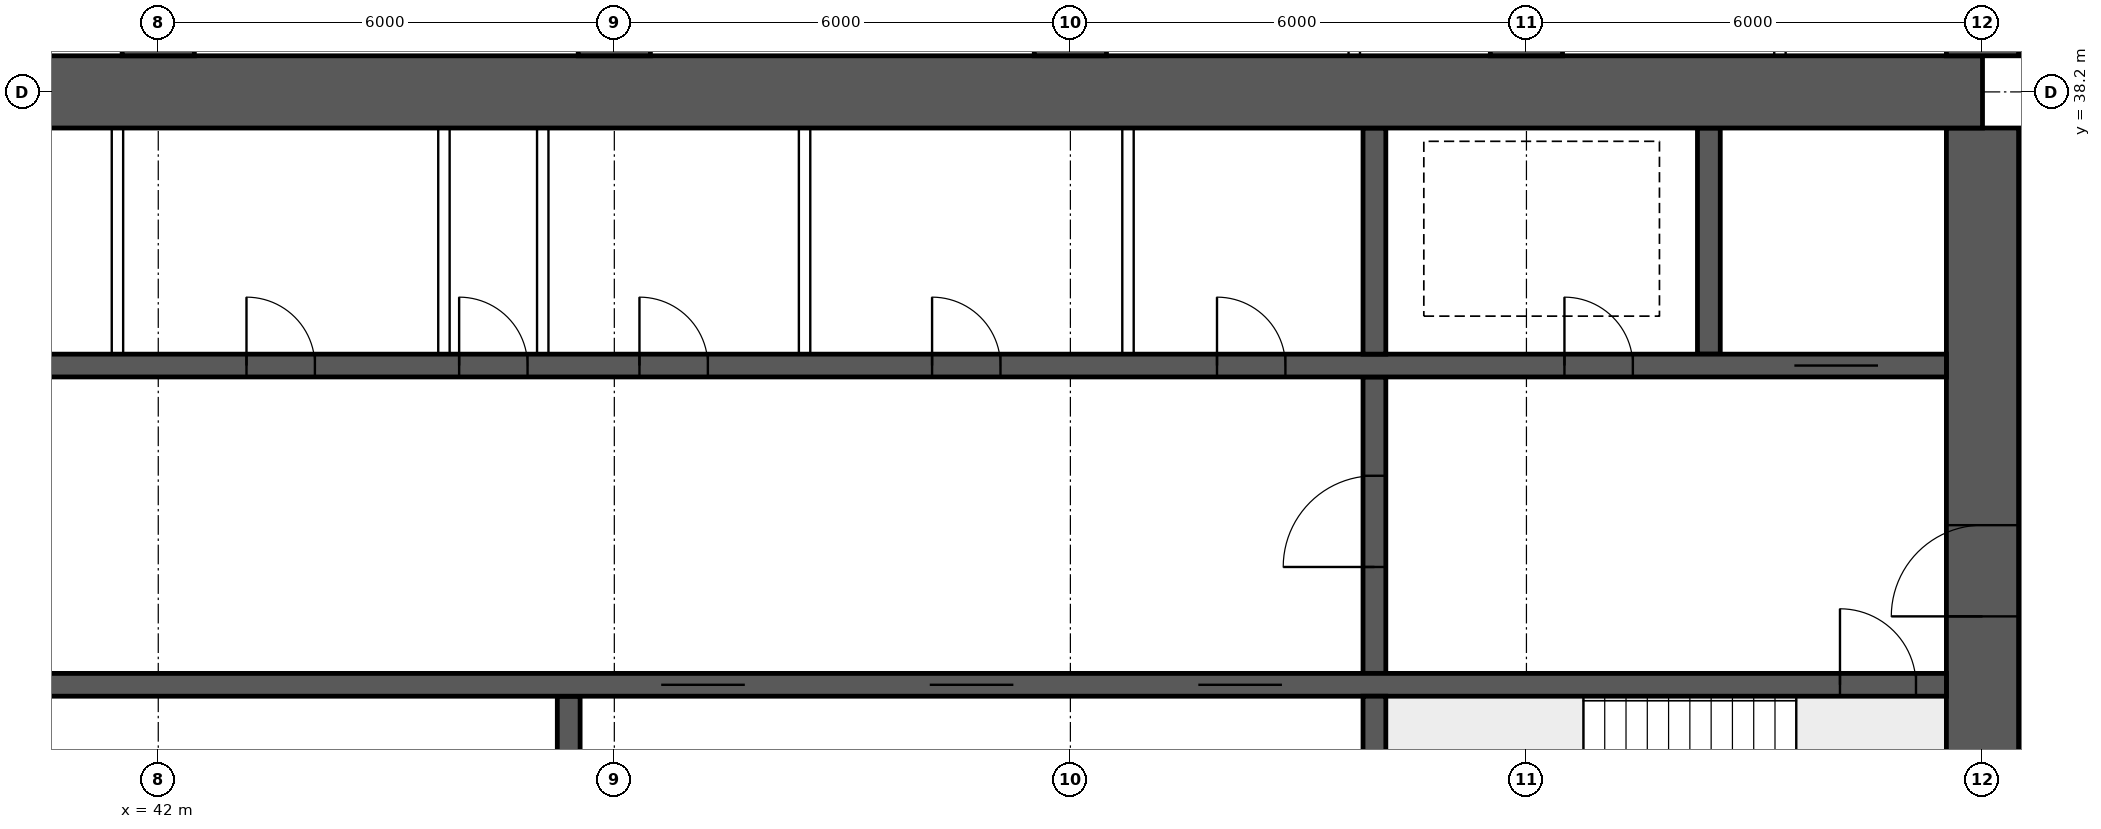
"""IFC4 building model, lengths in metres.
Left out: names, types, materials, properties, quantities, classifications, styles, units other than length and angle.
Written with IfcOpenShell. Run it as: python <this file> out.ifc"""

import sys

from ifc_helpers import new_model, si_unit, direction, frame, frame_2d, origin, place, context, subcontext, project, spatial, rectangle, extrude, element, fill, save


model = new_model("IFC4")
c1 = context("Model", 3, precision=1e-05, world=origin(), true_north=direction((0.0, 1.0)))
c2 = subcontext(c1, "Body", "Model", "MODEL_VIEW")
j1 = project(units=[si_unit("LENGTHUNIT", "METRE"), si_unit("PLANEANGLEUNIT", "RADIAN")], contexts=[c1])
p1 = place(None, origin())
s1 = spatial("IfcSite", under=j1, at=p1, CompositionType="ELEMENT")
p2 = place(p1, origin())
s2 = spatial("IfcBuilding", under=s1, at=p2, CompositionType="ELEMENT")
p3 = place(p2, frame((0.0, 0.0, 114.4)))
s3 = spatial("IfcBuildingStorey", under=s2, at=p3, CompositionType="ELEMENT", Elevation=114.4)
p4 = place(p3, frame((18.0, 38.2, 0.0), z_axis=(0.0, 0.0, 1.0), x_axis=(1.0, 0.0, 0.0)))
e1 = element("IfcWall", 1, at=p4, inside=s3, PredefinedType="SHEAR", context=c2, shape_type="SweptSolid", body=[
    extrude(rectangle(XDim=48.0, YDim=0.95, at=frame_2d((24.0, 0.0))), origin(), (0.0, 0.0, 1.0), 3.75),
])
p5 = place(p3, frame((66.0, 26.275, 0.0), z_axis=(0.0, 0.0, 1.0), x_axis=(0.0, 1.0, 0.0)))
e2 = element("IfcWall", 2, at=p5, inside=s3, PredefinedType="SHEAR", context=c2, shape_type="SweptSolid", body=[
    extrude(rectangle(XDim=11.45, YDim=0.95, at=frame_2d((5.725, 0.0))), origin(), (0.0, 0.0, 1.0), 3.75),
])
p6 = place(p5, frame((5.025, 0.0, 0.0)))
e3 = element("IfcOpeningElement", 3, at=p6, cuts=e2, PredefinedType="OPENING", context=c2, shape_type="SweptSolid", body=[
    extrude(rectangle(XDim=1.2, YDim=2.1, at=frame_2d((0.6, 1.05))), frame((0.0, 0.485, 0.0), z_axis=(0.0, -1.0, 0.0), x_axis=(1.0, 0.0, 0.0)), (0.0, 0.0, 1.0), 0.97),
])
p7 = place(p3, frame((18.475, 30.4, 0.0), z_axis=(0.0, 0.0, 1.0), x_axis=(1.0, 0.0, 0.0)))
e4 = element("IfcWall", 4, at=p7, inside=s3, PredefinedType="SHEAR", context=c2, shape_type="SweptSolid", body=[
    extrude(rectangle(XDim=47.05, YDim=0.3, at=frame_2d((23.525, 0.0))), origin(), (0.0, 0.0, 1.0), 3.75),
])
p8 = place(p7, frame((0.4, 0.0, 0.0)))
e5 = element("IfcOpeningElement", 5, at=p8, cuts=e4, PredefinedType="OPENING", context=c2, shape_type="SweptSolid", body=[
    extrude(rectangle(XDim=1.0, YDim=2.1, at=frame_2d((0.5, 1.05))), frame((0.0, 0.16, 0.0), z_axis=(0.0, -1.0, 0.0), x_axis=(1.0, 0.0, 0.0)), (0.0, 0.0, 1.0), 0.32),
])
p9 = place(p7, frame((45.65, 0.0, 0.0)))
e6 = element("IfcOpeningElement", 6, at=p9, cuts=e4, PredefinedType="OPENING", context=c2, shape_type="SweptSolid", body=[
    extrude(rectangle(XDim=1.0, YDim=2.1, at=frame_2d((0.5, 1.05))), frame((0.0, 0.16, 0.0), z_axis=(0.0, -1.0, 0.0), x_axis=(1.0, 0.0, 0.0)), (0.0, 0.0, 1.0), 0.32),
])
p10 = place(p7, frame((8.275, 0.0, 0.0)))
e7 = element("IfcOpeningElement", 7, at=p10, cuts=e4, PredefinedType="OPENING", context=c2, shape_type="SweptSolid", body=[
    extrude(rectangle(XDim=1.1, YDim=2.1, at=frame_2d((0.55, 1.05))), frame((0.0, 0.16, 0.0), z_axis=(0.0, -1.0, 0.0), x_axis=(1.0, 0.0, 0.0)), (0.0, 0.0, 1.0), 0.32),
])
p11 = place(p7, frame((10.875, 0.0, 0.0)))
e8 = element("IfcOpeningElement", 8, at=p11, cuts=e4, PredefinedType="OPENING", context=c2, shape_type="SweptSolid", body=[
    extrude(rectangle(XDim=1.1, YDim=2.1, at=frame_2d((0.55, 1.05))), frame((0.0, 0.16, 0.0), z_axis=(0.0, -1.0, 0.0), x_axis=(1.0, 0.0, 0.0)), (0.0, 0.0, 1.0), 0.32),
])
p12 = place(p7, frame((13.475, 0.0, 0.0)))
e9 = element("IfcOpeningElement", 9, at=p12, cuts=e4, PredefinedType="OPENING", context=c2, shape_type="SweptSolid", body=[
    extrude(rectangle(XDim=1.1, YDim=2.1, at=frame_2d((0.55, 1.05))), frame((0.0, 0.16, 0.0), z_axis=(0.0, -1.0, 0.0), x_axis=(1.0, 0.0, 0.0)), (0.0, 0.0, 1.0), 0.32),
])
p13 = place(p7, frame((16.075, 0.0, 0.0)))
e10 = element("IfcOpeningElement", 10, at=p13, cuts=e4, PredefinedType="OPENING", context=c2, shape_type="SweptSolid", body=[
    extrude(rectangle(XDim=1.1, YDim=2.1, at=frame_2d((0.55, 1.05))), frame((0.0, 0.16, 0.0), z_axis=(0.0, -1.0, 0.0), x_axis=(1.0, 0.0, 0.0)), (0.0, 0.0, 1.0), 0.32),
])
p14 = place(p7, frame((18.85, 0.0, 0.0)))
e11 = element("IfcOpeningElement", 11, at=p14, cuts=e4, PredefinedType="OPENING", context=c2, shape_type="SweptSolid", body=[
    extrude(rectangle(XDim=0.9, YDim=2.1, at=frame_2d((0.45, 1.05))), frame((0.0, 0.16, 0.0), z_axis=(0.0, -1.0, 0.0), x_axis=(1.0, 0.0, 0.0)), (0.0, 0.0, 1.0), 0.32),
])
p15 = place(p7, frame((30.142, 0.0, 0.0)))
e12 = element("IfcOpeningElement", 12, at=p15, cuts=e4, PredefinedType="OPENING", context=c2, shape_type="SweptSolid", body=[
    extrude(rectangle(XDim=1.1, YDim=2.1, at=frame_2d((0.55, 1.05))), frame((0.0, 0.16, 0.0), z_axis=(0.0, -1.0, 0.0), x_axis=(1.0, 0.0, 0.0)), (0.0, 0.0, 1.0), 0.32),
])
p16 = place(p7, frame((33.675, 0.0, 0.0)))
e13 = element("IfcOpeningElement", 13, at=p16, cuts=e4, PredefinedType="OPENING", context=c2, shape_type="SweptSolid", body=[
    extrude(rectangle(XDim=1.1, YDim=2.1, at=frame_2d((0.55, 1.05))), frame((0.0, 0.16, 0.0), z_axis=(0.0, -1.0, 0.0), x_axis=(1.0, 0.0, 0.0)), (0.0, 0.0, 1.0), 0.32),
])
p17 = place(p7, frame((37.208, 0.0, 0.0)))
e14 = element("IfcOpeningElement", 14, at=p17, cuts=e4, PredefinedType="OPENING", context=c2, shape_type="SweptSolid", body=[
    extrude(rectangle(XDim=1.1, YDim=2.1, at=frame_2d((0.55, 1.05))), frame((0.0, 0.16, 0.0), z_axis=(0.0, -1.0, 0.0), x_axis=(1.0, 0.0, 0.0)), (0.0, 0.0, 1.0), 0.32),
])
p18 = place(p3, frame((18.475, 34.6, 0.0), z_axis=(0.0, 0.0, 1.0), x_axis=(1.0, 0.0, 0.0)))
e15 = element("IfcWall", 15, at=p18, inside=s3, PredefinedType="SHEAR", context=c2, shape_type="SweptSolid", body=[
    extrude(rectangle(XDim=47.05, YDim=0.3, at=frame_2d((23.525, 0.0))), origin(), (0.0, 0.0, 1.0), 3.75),
])
p19 = place(p18, frame((0.9, 0.0, 0.0)))
e16 = element("IfcOpeningElement", 16, at=p19, cuts=e15, PredefinedType="OPENING", context=c2, shape_type="SweptSolid", body=[
    extrude(rectangle(XDim=1.1, YDim=2.1, at=frame_2d((0.55, 1.05))), frame((0.0, 0.16, 0.0), z_axis=(0.0, -1.0, 0.0), x_axis=(1.0, 0.0, 0.0)), (0.0, 0.0, 1.0), 0.32),
])
p20 = place(p18, frame((45.05, 0.0, 0.0)))
e17 = element("IfcOpeningElement", 17, at=p20, cuts=e15, PredefinedType="OPENING", context=c2, shape_type="SweptSolid", body=[
    extrude(rectangle(XDim=1.1, YDim=2.1, at=frame_2d((0.55, 1.05))), frame((0.0, 0.16, 0.0), z_axis=(0.0, -1.0, 0.0), x_axis=(1.0, 0.0, 0.0)), (0.0, 0.0, 1.0), 0.32),
])
p21 = place(p18, frame((4.125, 0.0, 0.0)))
e18 = element("IfcOpeningElement", 18, at=p21, cuts=e15, PredefinedType="OPENING", context=c2, shape_type="SweptSolid", body=[
    extrude(rectangle(XDim=0.9, YDim=2.1, at=frame_2d((0.45, 1.05))), frame((0.0, 0.16, 0.0), z_axis=(0.0, -1.0, 0.0), x_axis=(1.0, 0.0, 0.0)), (0.0, 0.0, 1.0), 0.32),
])
p22 = place(p18, frame((42.025, 0.0, 0.0)))
e19 = element("IfcOpeningElement", 19, at=p22, cuts=e15, PredefinedType="OPENING", context=c2, shape_type="SweptSolid", body=[
    extrude(rectangle(XDim=0.9, YDim=2.1, at=frame_2d((0.45, 1.05))), frame((0.0, 0.16, 0.0), z_axis=(0.0, -1.0, 0.0), x_axis=(1.0, 0.0, 0.0)), (0.0, 0.0, 1.0), 0.32),
])
p23 = place(p18, frame((8.9, 0.0, 0.0)))
e20 = element("IfcOpeningElement", 20, at=p23, cuts=e15, PredefinedType="OPENING", context=c2, shape_type="SweptSolid", body=[
    extrude(rectangle(XDim=0.9, YDim=2.1, at=frame_2d((0.45, 1.05))), frame((0.0, 0.16, 0.0), z_axis=(0.0, -1.0, 0.0), x_axis=(1.0, 0.0, 0.0)), (0.0, 0.0, 1.0), 0.32),
])
p24 = place(p18, frame((12.874, 0.0, 0.0)))
e21 = element("IfcOpeningElement", 21, at=p24, cuts=e15, PredefinedType="OPENING", context=c2, shape_type="SweptSolid", body=[
    extrude(rectangle(XDim=0.9, YDim=2.1, at=frame_2d((0.45, 1.05))), frame((0.0, 0.16, 0.0), z_axis=(0.0, -1.0, 0.0), x_axis=(1.0, 0.0, 0.0)), (0.0, 0.0, 1.0), 0.32),
])
p25 = place(p18, frame((16.521, 0.0, 0.0)))
e22 = element("IfcOpeningElement", 22, at=p25, cuts=e15, PredefinedType="OPENING", context=c2, shape_type="SweptSolid", body=[
    extrude(rectangle(XDim=0.9, YDim=2.1, at=frame_2d((0.45, 1.05))), frame((0.0, 0.16, 0.0), z_axis=(0.0, -1.0, 0.0), x_axis=(1.0, 0.0, 0.0)), (0.0, 0.0, 1.0), 0.32),
])
p26 = place(p18, frame((20.28, 0.0, 0.0)))
e23 = element("IfcOpeningElement", 23, at=p26, cuts=e15, PredefinedType="OPENING", context=c2, shape_type="SweptSolid", body=[
    extrude(rectangle(XDim=0.9, YDim=2.1, at=frame_2d((0.45, 1.05))), frame((0.0, 0.16, 0.0), z_axis=(0.0, -1.0, 0.0), x_axis=(1.0, 0.0, 0.0)), (0.0, 0.0, 1.0), 0.32),
])
p27 = place(p18, frame((24.686, 0.0, 0.0)))
e24 = element("IfcOpeningElement", 24, at=p27, cuts=e15, PredefinedType="OPENING", context=c2, shape_type="SweptSolid", body=[
    extrude(rectangle(XDim=0.9, YDim=2.1, at=frame_2d((0.45, 1.05))), frame((0.0, 0.16, 0.0), z_axis=(0.0, -1.0, 0.0), x_axis=(1.0, 0.0, 0.0)), (0.0, 0.0, 1.0), 0.32),
])
p28 = place(p18, frame((27.483, 0.0, 0.0)))
e25 = element("IfcOpeningElement", 25, at=p28, cuts=e15, PredefinedType="OPENING", context=c2, shape_type="SweptSolid", body=[
    extrude(rectangle(XDim=0.9, YDim=2.1, at=frame_2d((0.45, 1.05))), frame((0.0, 0.16, 0.0), z_axis=(0.0, -1.0, 0.0), x_axis=(1.0, 0.0, 0.0)), (0.0, 0.0, 1.0), 0.32),
])
p29 = place(p18, frame((29.856, 0.0, 0.0)))
e26 = element("IfcOpeningElement", 26, at=p29, cuts=e15, PredefinedType="OPENING", context=c2, shape_type="SweptSolid", body=[
    extrude(rectangle(XDim=0.9, YDim=2.1, at=frame_2d((0.45, 1.05))), frame((0.0, 0.16, 0.0), z_axis=(0.0, -1.0, 0.0), x_axis=(1.0, 0.0, 0.0)), (0.0, 0.0, 1.0), 0.32),
])
p30 = place(p18, frame((33.706, 0.0, 0.0)))
e27 = element("IfcOpeningElement", 27, at=p30, cuts=e15, PredefinedType="OPENING", context=c2, shape_type="SweptSolid", body=[
    extrude(rectangle(XDim=0.9, YDim=2.1, at=frame_2d((0.45, 1.05))), frame((0.0, 0.16, 0.0), z_axis=(0.0, -1.0, 0.0), x_axis=(1.0, 0.0, 0.0)), (0.0, 0.0, 1.0), 0.32),
])
p31 = place(p18, frame((37.454, 0.0, 0.0)))
e28 = element("IfcOpeningElement", 28, at=p31, cuts=e15, PredefinedType="OPENING", context=c2, shape_type="SweptSolid", body=[
    extrude(rectangle(XDim=0.9, YDim=2.1, at=frame_2d((0.45, 1.05))), frame((0.0, 0.16, 0.0), z_axis=(0.0, -1.0, 0.0), x_axis=(1.0, 0.0, 0.0)), (0.0, 0.0, 1.0), 0.32),
])
p32 = place(p3, frame((58.0, 26.275, 0.0), z_axis=(0.0, 0.0, 1.0), x_axis=(0.0, 1.0, 0.0)))
e29 = element("IfcWall", 29, at=p32, inside=s3, PredefinedType="SHEAR", context=c2, shape_type="SweptSolid", body=[
    extrude(rectangle(XDim=3.975, YDim=0.3, at=frame_2d((1.988, 0.0))), origin(), (0.0, 0.0, 1.0), 3.75),
])
p33 = place(p3, frame((58.0, 30.55, 0.0), z_axis=(0.0, 0.0, 1.0), x_axis=(0.0, 1.0, 0.0)))
e30 = element("IfcWall", 30, at=p33, inside=s3, PredefinedType="SHEAR", context=c2, shape_type="SweptSolid", body=[
    extrude(rectangle(XDim=3.9, YDim=0.3, at=frame_2d((1.95, 0.0))), origin(), (0.0, 0.0, 1.0), 3.75),
])
p34 = place(p33, frame((1.4, 0.0, 0.0)))
e31 = element("IfcOpeningElement", 31, at=p34, cuts=e30, PredefinedType="OPENING", context=c2, shape_type="SweptSolid", body=[
    extrude(rectangle(XDim=1.2, YDim=2.1, at=frame_2d((0.6, 1.05))), frame((0.0, 0.16, 0.0), z_axis=(0.0, -1.0, 0.0), x_axis=(1.0, 0.0, 0.0)), (0.0, 0.0, 1.0), 0.32),
])
for number, where, z_axis, x_axis in (
    (32, (62.4, 34.75, 0.0), (0.0, 0.0, 1.0), (0.0, 1.0, 0.0)),
    (33, (58.0, 34.75, 0.0), (0.0, 0.0, 1.0), (0.0, 1.0, 0.0)),
):
    element("IfcWall", number, at=place(p3, frame(where, z_axis=z_axis, x_axis=x_axis)), inside=s3, PredefinedType="SHEAR", context=c2, shape_type="SweptSolid", body=[
        extrude(rectangle(XDim=2.975, YDim=0.3, at=frame_2d((1.488, 0.0))), origin(), (0.0, 0.0, 1.0), 3.75),
    ])
p35 = place(p3, frame((47.4, 26.275, 0.0), z_axis=(0.0, 0.0, 1.0), x_axis=(0.0, 1.0, 0.0)))
e34 = element("IfcWall", 34, at=p35, inside=s3, PredefinedType="SHEAR", context=c2, shape_type="SweptSolid", body=[
    extrude(rectangle(XDim=3.975, YDim=0.3, at=frame_2d((1.988, 0.0))), origin(), (0.0, 0.0, 1.0), 3.75),
])
for number, where, z_axis, x_axis in (
    (35, (42.0, 38.675, 0.0), (0.0, 0.0, 1.0), (0.0, 1.0, 0.0)),
    (36, (48.0, 38.675, 0.0), (0.0, 0.0, 1.0), (0.0, 1.0, 0.0)),
    (37, (54.0, 38.675, 0.0), (0.0, 0.0, 1.0), (0.0, 1.0, 0.0)),
    (38, (60.0, 38.675, 0.0), (0.0, 0.0, 1.0), (0.0, 1.0, 0.0)),
    (39, (66.0, 38.675, 0.0), (0.0, 0.0, 1.0), (0.0, 1.0, 0.0)),
):
    element("IfcWall", number, at=place(p3, frame(where, z_axis=z_axis, x_axis=x_axis)), inside=s3, PredefinedType="SHEAR", context=c2, shape_type="SweptSolid", body=[
        extrude(rectangle(XDim=9.325, YDim=0.95, at=frame_2d((4.663, 0.0))), origin(), (0.0, 0.0, 1.0), 3.75),
    ])
for number, where, z_axis, x_axis in (
    (40, (41.463, 34.75, 0.0), (0.0, 0.0, 1.0), (0.0, 1.0, 0.0)),
    (41, (45.758, 34.75, 0.0), (0.0, 0.0, 1.0), (0.0, 1.0, 0.0)),
    (42, (47.058, 34.75, 0.0), (0.0, 0.0, 1.0), (0.0, 1.0, 0.0)),
    (43, (50.503, 34.75, 0.0), (0.0, 0.0, 1.0), (0.0, 1.0, 0.0)),
    (44, (54.758, 34.75, 0.0), (0.0, 0.0, 1.0), (0.0, 1.0, 0.0)),
):
    element("IfcWall", number, at=place(p3, frame(where, z_axis=z_axis, x_axis=x_axis)), inside=s3, PredefinedType="SOLIDWALL", context=c2, shape_type="SweptSolid", body=[
        extrude(rectangle(XDim=2.975, YDim=0.15, at=frame_2d((1.488, 0.0))), origin(), (0.0, 0.0, 1.0), 3.5),
    ])
for number, where, z_axis, x_axis in (
    (45, (57.735, 38.675, 0.0), (0.0, 0.0, 1.0), (0.0, 1.0, 0.0)),
    (46, (63.335, 38.675, 0.0), (0.0, 0.0, 1.0), (0.0, 1.0, 0.0)),
):
    element("IfcWall", number, at=place(p3, frame(where, z_axis=z_axis, x_axis=x_axis)), inside=s3, PredefinedType="PARTITIONING", context=c2, shape_type="SweptSolid", body=[
        extrude(rectangle(XDim=9.225, YDim=0.15, at=frame_2d((4.612, 0.0))), origin(), (0.0, 0.0, 1.0), 3.5),
    ])
p36 = place(p6, origin())
e47 = element("IfcDoor", 47, at=p36, inside=s3, OperationType="SINGLE_SWING_LEFT", PredefinedType="DOOR", context=c2, shape_type="SweptSolid", body=[
    extrude(rectangle(XDim=1.2, YDim=2.1, at=frame_2d((0.6, 1.05))), frame((0.0, 0.025, 0.0), z_axis=(0.0, -1.0, 0.0), x_axis=(1.0, 0.0, 0.0)), (0.0, 0.0, 1.0), 0.05),
])
fill(e3, e47)
p37 = place(p9, origin())
e48 = element("IfcDoor", 48, at=p37, inside=s3, OperationType="SINGLE_SWING_LEFT", PredefinedType="DOOR", context=c2, shape_type="SweptSolid", body=[
    extrude(rectangle(XDim=1.0, YDim=2.1, at=frame_2d((0.5, 1.05))), frame((0.0, 0.025, 0.0), z_axis=(0.0, -1.0, 0.0), x_axis=(1.0, 0.0, 0.0)), (0.0, 0.0, 1.0), 0.05),
])
fill(e6, e48)
p38 = place(p20, origin())
e49 = element("IfcDoor", 49, at=p38, inside=s3, OperationType="DOUBLE_DOOR_SLIDING", PredefinedType="DOOR", context=c2, shape_type="SweptSolid", body=[
    extrude(rectangle(XDim=1.1, YDim=2.1, at=frame_2d((0.55, 1.05))), frame((0.0, 0.025, 0.0), z_axis=(0.0, -1.0, 0.0), x_axis=(1.0, 0.0, 0.0)), (0.0, 0.0, 1.0), 0.05),
])
fill(e17, e49)
p39 = place(p22, origin())
e50 = element("IfcDoor", 50, at=p39, inside=s3, OperationType="SINGLE_SWING_LEFT", PredefinedType="DOOR", context=c2, shape_type="SweptSolid", body=[
    extrude(rectangle(XDim=0.9, YDim=2.1, at=frame_2d((0.45, 1.05))), frame((0.0, 0.025, 0.0), z_axis=(0.0, -1.0, 0.0), x_axis=(1.0, 0.0, 0.0)), (0.0, 0.0, 1.0), 0.05),
])
fill(e19, e50)
p40 = place(p34, origin())
e51 = element("IfcDoor", 51, at=p40, inside=s3, OperationType="SINGLE_SWING_LEFT", PredefinedType="DOOR", context=c2, shape_type="SweptSolid", body=[
    extrude(rectangle(XDim=1.2, YDim=2.1, at=frame_2d((0.6, 1.05))), frame((0.0, 0.025, 0.0), z_axis=(0.0, -1.0, 0.0), x_axis=(1.0, 0.0, 0.0)), (0.0, 0.0, 1.0), 0.05),
])
fill(e31, e51)
p41 = place(p27, origin())
e52 = element("IfcDoor", 52, at=p41, inside=s3, OperationType="SINGLE_SWING_LEFT", PredefinedType="DOOR", context=c2, shape_type="SweptSolid", body=[
    extrude(rectangle(XDim=0.9, YDim=2.1, at=frame_2d((0.45, 1.05))), frame((0.0, 0.025, 0.0), z_axis=(0.0, -1.0, 0.0), x_axis=(1.0, 0.0, 0.0)), (0.0, 0.0, 1.0), 0.05),
])
fill(e24, e52)
p42 = place(p28, origin())
e53 = element("IfcDoor", 53, at=p42, inside=s3, OperationType="SINGLE_SWING_LEFT", PredefinedType="DOOR", context=c2, shape_type="SweptSolid", body=[
    extrude(rectangle(XDim=0.9, YDim=2.1, at=frame_2d((0.45, 1.05))), frame((0.0, 0.025, 0.0), z_axis=(0.0, -1.0, 0.0), x_axis=(1.0, 0.0, 0.0)), (0.0, 0.0, 1.0), 0.05),
])
fill(e25, e53)
p43 = place(p29, origin())
e54 = element("IfcDoor", 54, at=p43, inside=s3, OperationType="SINGLE_SWING_LEFT", PredefinedType="DOOR", context=c2, shape_type="SweptSolid", body=[
    extrude(rectangle(XDim=0.9, YDim=2.1, at=frame_2d((0.45, 1.05))), frame((0.0, 0.025, 0.0), z_axis=(0.0, -1.0, 0.0), x_axis=(1.0, 0.0, 0.0)), (0.0, 0.0, 1.0), 0.05),
])
fill(e26, e54)
p44 = place(p30, origin())
e55 = element("IfcDoor", 55, at=p44, inside=s3, OperationType="SINGLE_SWING_LEFT", PredefinedType="DOOR", context=c2, shape_type="SweptSolid", body=[
    extrude(rectangle(XDim=0.9, YDim=2.1, at=frame_2d((0.45, 1.05))), frame((0.0, 0.025, 0.0), z_axis=(0.0, -1.0, 0.0), x_axis=(1.0, 0.0, 0.0)), (0.0, 0.0, 1.0), 0.05),
])
fill(e27, e55)
p45 = place(p31, origin())
e56 = element("IfcDoor", 56, at=p45, inside=s3, OperationType="SINGLE_SWING_LEFT", PredefinedType="DOOR", context=c2, shape_type="SweptSolid", body=[
    extrude(rectangle(XDim=0.9, YDim=2.1, at=frame_2d((0.45, 1.05))), frame((0.0, 0.025, 0.0), z_axis=(0.0, -1.0, 0.0), x_axis=(1.0, 0.0, 0.0)), (0.0, 0.0, 1.0), 0.05),
])
fill(e28, e56)
p46 = place(p15, origin())
e57 = element("IfcDoor", 57, at=p46, inside=s3, OperationType="DOUBLE_DOOR_SLIDING", PredefinedType="DOOR", context=c2, shape_type="SweptSolid", body=[
    extrude(rectangle(XDim=1.1, YDim=2.1, at=frame_2d((0.55, 1.05))), frame((0.0, 0.025, 0.0), z_axis=(0.0, -1.0, 0.0), x_axis=(1.0, 0.0, 0.0)), (0.0, 0.0, 1.0), 0.05),
])
fill(e12, e57)
p47 = place(p16, origin())
e58 = element("IfcDoor", 58, at=p47, inside=s3, OperationType="DOUBLE_DOOR_SLIDING", PredefinedType="DOOR", context=c2, shape_type="SweptSolid", body=[
    extrude(rectangle(XDim=1.1, YDim=2.1, at=frame_2d((0.55, 1.05))), frame((0.0, 0.025, 0.0), z_axis=(0.0, -1.0, 0.0), x_axis=(1.0, 0.0, 0.0)), (0.0, 0.0, 1.0), 0.05),
])
fill(e13, e58)
p48 = place(p17, origin())
e59 = element("IfcDoor", 59, at=p48, inside=s3, OperationType="DOUBLE_DOOR_SLIDING", PredefinedType="DOOR", context=c2, shape_type="SweptSolid", body=[
    extrude(rectangle(XDim=1.1, YDim=2.1, at=frame_2d((0.55, 1.05))), frame((0.0, 0.025, 0.0), z_axis=(0.0, -1.0, 0.0), x_axis=(1.0, 0.0, 0.0)), (0.0, 0.0, 1.0), 0.05),
])
fill(e14, e59)
save(model, sys.argv[1])
